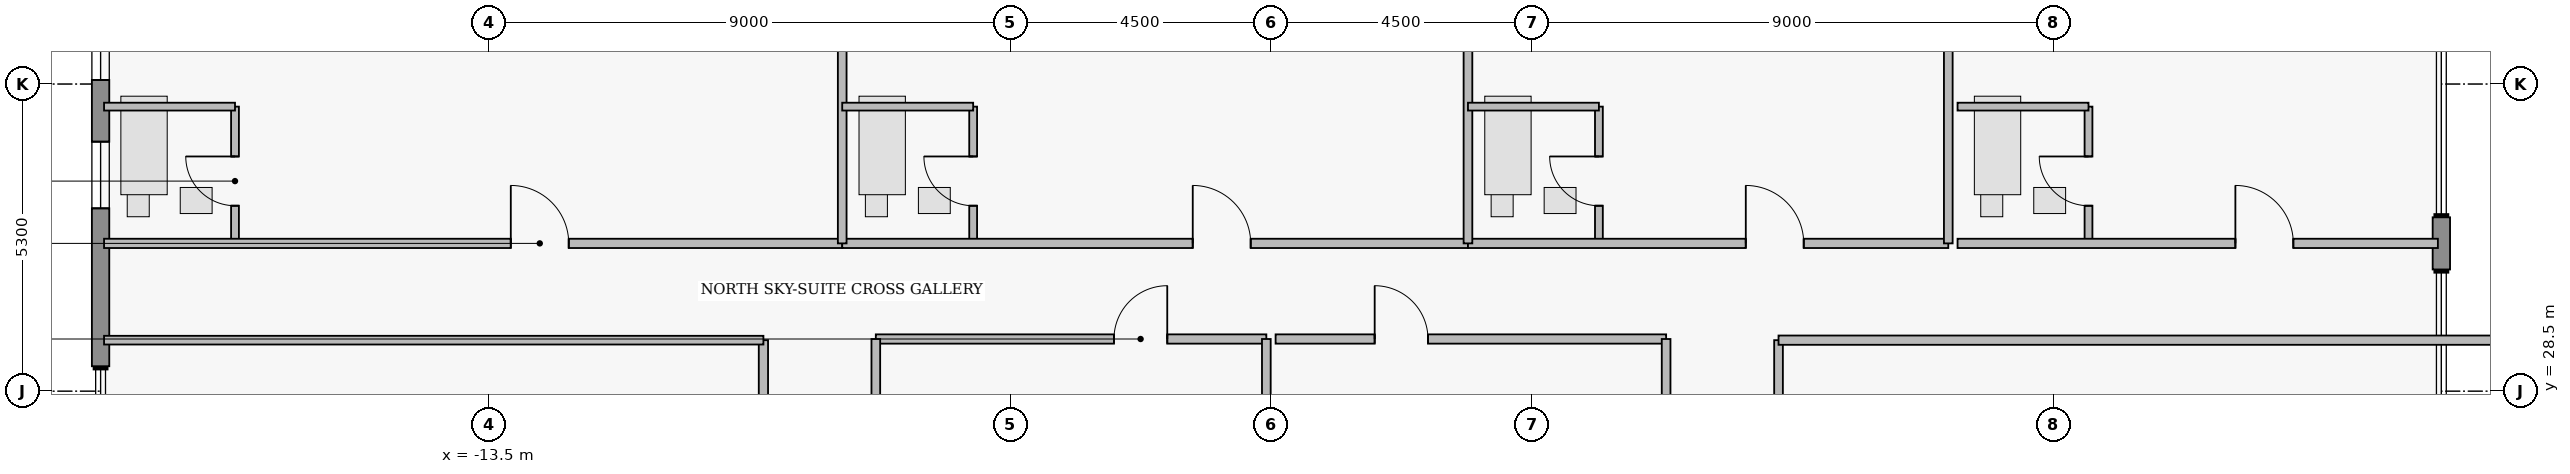
"""IFC4 building model, lengths in metres.
Left out: names, types, materials, properties, quantities, classifications, styles, units other than length and angle.
Written with IfcOpenShell. Run it as: python <this file> out.ifc"""

import sys

from ifc_helpers import new_model, si_unit, direction, frame, frame_2d, origin, place, context, subcontext, project, spatial, rectangle, extrude, element, fill, save


model = new_model("IFC4")
c1 = context("Model", 3, precision=1e-05, world=origin(), true_north=direction((0.0, 1.0)))
c2 = subcontext(c1, "Body", "Model", "MODEL_VIEW")
j1 = project(units=[si_unit("LENGTHUNIT", "METRE"), si_unit("PLANEANGLEUNIT", "RADIAN")], contexts=[c1])
p1 = place(None, origin())
s1 = spatial("IfcSite", under=j1, at=p1, CompositionType="ELEMENT")
p2 = place(p1, origin())
s2 = spatial("IfcBuilding", under=s1, at=p2, CompositionType="ELEMENT")
p3 = place(p2, frame((0.0, 0.0, 261.85)))
s3 = spatial("IfcBuildingStorey", under=s2, at=p3, CompositionType="ELEMENT", Elevation=261.85)
p4 = place(p3, frame((-20.2, 28.93, 0.0), z_axis=(0.0, 0.0, 1.0), x_axis=(0.0, 1.0, 0.0)))
e1 = element("IfcWall", 1, at=p4, inside=s3, PredefinedType="STANDARD", context=c2, shape_type="SweptSolid", body=[
    extrude(rectangle(XDim=6.67, YDim=0.3, at=frame_2d((3.335, 0.0))), origin(), (0.0, 0.0, 1.0), 3.48),
])
p5 = place(p4, frame((2.725, 0.0, 0.95)))
e2 = element("IfcOpeningElement", 2, at=p5, cuts=e1, PredefinedType="OPENING", context=c2, shape_type="SweptSolid", body=[
    extrude(rectangle(XDim=1.15, YDim=1.55, at=frame_2d((0.575, 0.775))), frame((0.0, 0.16, 0.0), z_axis=(0.0, -1.0, 0.0), x_axis=(1.0, 0.0, 0.0)), (0.0, 0.0, 1.0), 0.32),
])
p6 = place(p4, frame((4.94, 0.0, 0.95)))
e3 = element("IfcOpeningElement", 3, at=p6, cuts=e1, PredefinedType="OPENING", context=c2, shape_type="SweptSolid", body=[
    extrude(rectangle(XDim=1.15, YDim=1.55, at=frame_2d((0.575, 0.775))), frame((0.0, 0.16, 0.0), z_axis=(0.0, -1.0, 0.0), x_axis=(1.0, 0.0, 0.0)), (0.0, 0.0, 1.0), 0.32),
])
p7 = place(p3, frame((20.2, 31.5, 0.0), z_axis=(0.0, 0.0, 1.0), x_axis=(0.0, -1.0, 0.0)))
e4 = element("IfcWall", 4, at=p7, inside=s3, PredefinedType="STANDARD", context=c2, shape_type="SweptSolid", body=[
    extrude(rectangle(XDim=0.9, YDim=0.3, at=frame_2d((0.45, 0.0))), origin(), (0.0, 0.0, 1.0), 3.48),
])
p8 = place(p3, frame((-17.88, 31.05, 0.0), z_axis=(0.0, 0.0, 1.0), x_axis=(0.0, 1.0, 0.0)))
e5 = element("IfcWall", 5, at=p8, inside=s3, PredefinedType="PLUMBINGWALL", context=c2, shape_type="SweptSolid", body=[
    extrude(rectangle(XDim=2.36, YDim=0.135, at=frame_2d((1.18, 0.0))), origin(), (0.0, 0.0, 1.0), 3.48),
])
p9 = place(p8, frame((0.65, 0.0, 0.0)))
e6 = element("IfcOpeningElement", 6, at=p9, cuts=e5, PredefinedType="OPENING", context=c2, shape_type="SweptSolid", body=[
    extrude(rectangle(XDim=0.85, YDim=2.1, at=frame_2d((0.425, 1.05))), frame((0.0, 0.077, 0.0), z_axis=(0.0, -1.0, 0.0), x_axis=(1.0, 0.0, 0.0)), (0.0, 0.0, 1.0), 0.155),
])
p10 = place(p3, frame((-20.14, 31.05, 0.0), z_axis=(0.0, 0.0, 1.0), x_axis=(1.0, 0.0, 0.0)))
e7 = element("IfcWall", 7, at=p10, inside=s3, PredefinedType="PARTITIONING", context=c2, shape_type="SweptSolid", body=[
    extrude(rectangle(XDim=12.74, YDim=0.16, at=frame_2d((6.37, 0.0))), origin(), (0.0, 0.0, 1.0), 3.48),
])
p11 = place(p10, frame((7.02, 0.0, 0.0)))
e8 = element("IfcOpeningElement", 8, at=p11, cuts=e7, PredefinedType="OPENING", context=c2, shape_type="SweptSolid", body=[
    extrude(rectangle(XDim=1.0, YDim=2.15, at=frame_2d((0.5, 1.075))), frame((0.0, 0.09, 0.0), z_axis=(0.0, -1.0, 0.0), x_axis=(1.0, 0.0, 0.0)), (0.0, 0.0, 1.0), 0.18),
])
p12 = place(p3, frame((-5.14, 31.05, 0.0), z_axis=(0.0, 0.0, 1.0), x_axis=(0.0, 1.0, 0.0)))
e9 = element("IfcWall", 9, at=p12, inside=s3, PredefinedType="PLUMBINGWALL", context=c2, shape_type="SweptSolid", body=[
    extrude(rectangle(XDim=2.36, YDim=0.135, at=frame_2d((1.18, 0.0))), origin(), (0.0, 0.0, 1.0), 3.48),
])
p13 = place(p12, frame((0.65, 0.0, 0.0)))
e10 = element("IfcOpeningElement", 10, at=p13, cuts=e9, PredefinedType="OPENING", context=c2, shape_type="SweptSolid", body=[
    extrude(rectangle(XDim=0.85, YDim=2.1, at=frame_2d((0.425, 1.05))), frame((0.0, 0.077, 0.0), z_axis=(0.0, -1.0, 0.0), x_axis=(1.0, 0.0, 0.0)), (0.0, 0.0, 1.0), 0.155),
])
p14 = place(p3, frame((-7.4, 31.05, 0.0), z_axis=(0.0, 0.0, 1.0), x_axis=(1.0, 0.0, 0.0)))
e11 = element("IfcWall", 11, at=p14, inside=s3, PredefinedType="PARTITIONING", context=c2, shape_type="SweptSolid", body=[
    extrude(rectangle(XDim=10.8, YDim=0.16, at=frame_2d((5.4, 0.0))), origin(), (0.0, 0.0, 1.0), 3.48),
])
p15 = place(p14, frame((6.05, 0.0, 0.0)))
e12 = element("IfcOpeningElement", 12, at=p15, cuts=e11, PredefinedType="OPENING", context=c2, shape_type="SweptSolid", body=[
    extrude(rectangle(XDim=1.0, YDim=2.15, at=frame_2d((0.5, 1.075))), frame((0.0, 0.09, 0.0), z_axis=(0.0, -1.0, 0.0), x_axis=(1.0, 0.0, 0.0)), (0.0, 0.0, 1.0), 0.18),
])
p16 = place(p3, frame((5.66, 31.05, 0.0), z_axis=(0.0, 0.0, 1.0), x_axis=(0.0, 1.0, 0.0)))
e13 = element("IfcWall", 13, at=p16, inside=s3, PredefinedType="PLUMBINGWALL", context=c2, shape_type="SweptSolid", body=[
    extrude(rectangle(XDim=2.36, YDim=0.135, at=frame_2d((1.18, 0.0))), origin(), (0.0, 0.0, 1.0), 3.48),
])
p17 = place(p16, frame((0.65, 0.0, 0.0)))
e14 = element("IfcOpeningElement", 14, at=p17, cuts=e13, PredefinedType="OPENING", context=c2, shape_type="SweptSolid", body=[
    extrude(rectangle(XDim=0.85, YDim=2.1, at=frame_2d((0.425, 1.05))), frame((0.0, 0.077, 0.0), z_axis=(0.0, -1.0, 0.0), x_axis=(1.0, 0.0, 0.0)), (0.0, 0.0, 1.0), 0.155),
])
p18 = place(p3, frame((3.4, 31.05, 0.0), z_axis=(0.0, 0.0, 1.0), x_axis=(1.0, 0.0, 0.0)))
e15 = element("IfcWall", 15, at=p18, inside=s3, PredefinedType="PARTITIONING", context=c2, shape_type="SweptSolid", body=[
    extrude(rectangle(XDim=8.29, YDim=0.16, at=frame_2d((4.145, 0.0))), origin(), (0.0, 0.0, 1.0), 3.48),
])
p19 = place(p18, frame((4.795, 0.0, 0.0)))
e16 = element("IfcOpeningElement", 16, at=p19, cuts=e15, PredefinedType="OPENING", context=c2, shape_type="SweptSolid", body=[
    extrude(rectangle(XDim=1.0, YDim=2.15, at=frame_2d((0.5, 1.075))), frame((0.0, 0.09, 0.0), z_axis=(0.0, -1.0, 0.0), x_axis=(1.0, 0.0, 0.0)), (0.0, 0.0, 1.0), 0.18),
])
p20 = place(p3, frame((14.11, 31.05, 0.0), z_axis=(0.0, 0.0, 1.0), x_axis=(0.0, 1.0, 0.0)))
e17 = element("IfcWall", 17, at=p20, inside=s3, PredefinedType="PLUMBINGWALL", context=c2, shape_type="SweptSolid", body=[
    extrude(rectangle(XDim=2.36, YDim=0.135, at=frame_2d((1.18, 0.0))), origin(), (0.0, 0.0, 1.0), 2.362),
])
p21 = place(p20, frame((0.65, 0.0, 0.0)))
e18 = element("IfcOpeningElement", 18, at=p21, cuts=e17, PredefinedType="OPENING", context=c2, shape_type="SweptSolid", body=[
    extrude(rectangle(XDim=0.85, YDim=2.1, at=frame_2d((0.425, 1.05))), frame((0.0, 0.077, 0.0), z_axis=(0.0, -1.0, 0.0), x_axis=(1.0, 0.0, 0.0)), (0.0, 0.0, 1.0), 0.155),
])
p22 = place(p3, frame((11.85, 31.05, 0.0), z_axis=(0.0, 0.0, 1.0), x_axis=(1.0, 0.0, 0.0)))
e19 = element("IfcWall", 19, at=p22, inside=s3, PredefinedType="PARTITIONING", context=c2, shape_type="SweptSolid", body=[
    extrude(rectangle(XDim=8.29, YDim=0.16, at=frame_2d((4.145, 0.0))), origin(), (0.0, 0.0, 1.0), 3.48),
])
p23 = place(p22, frame((4.795, 0.0, 0.0)))
e20 = element("IfcOpeningElement", 20, at=p23, cuts=e19, PredefinedType="OPENING", context=c2, shape_type="SweptSolid", body=[
    extrude(rectangle(XDim=1.0, YDim=2.15, at=frame_2d((0.5, 1.075))), frame((0.0, 0.09, 0.0), z_axis=(0.0, -1.0, 0.0), x_axis=(1.0, 0.0, 0.0)), (0.0, 0.0, 1.0), 0.18),
])
p24 = place(p3, frame((-6.82, 29.4, 0.0), z_axis=(0.0, 0.0, 1.0), x_axis=(1.0, 0.0, 0.0)))
e21 = element("IfcWall", 21, at=p24, inside=s3, PredefinedType="PARTITIONING", context=c2, shape_type="SweptSolid", body=[
    extrude(rectangle(XDim=6.74, YDim=0.16, at=frame_2d((3.37, 0.0))), origin(), (0.0, 0.0, 1.0), 3.48),
])
p25 = place(p24, frame((4.11, 0.0, 0.0)))
e22 = element("IfcOpeningElement", 22, at=p25, cuts=e21, PredefinedType="OPENING", context=c2, shape_type="SweptSolid", body=[
    extrude(rectangle(XDim=0.92, YDim=2.12, at=frame_2d((0.46, 1.06))), frame((0.0, 0.09, 0.0), z_axis=(0.0, -1.0, 0.0), x_axis=(1.0, 0.0, 0.0)), (0.0, 0.0, 1.0), 0.18),
])
p26 = place(p3, frame((0.08, 29.4, 0.0), z_axis=(0.0, 0.0, 1.0), x_axis=(1.0, 0.0, 0.0)))
e23 = element("IfcWall", 23, at=p26, inside=s3, PredefinedType="PARTITIONING", context=c2, shape_type="SweptSolid", body=[
    extrude(rectangle(XDim=6.74, YDim=0.16, at=frame_2d((3.37, 0.0))), origin(), (0.0, 0.0, 1.0), 3.48),
])
p27 = place(p26, frame((1.71, 0.0, 0.0)))
e24 = element("IfcOpeningElement", 24, at=p27, cuts=e23, PredefinedType="OPENING", context=c2, shape_type="SweptSolid", body=[
    extrude(rectangle(XDim=0.92, YDim=2.12, at=frame_2d((0.46, 1.06))), frame((0.0, 0.09, 0.0), z_axis=(0.0, -1.0, 0.0), x_axis=(1.0, 0.0, 0.0)), (0.0, 0.0, 1.0), 0.18),
])
p28 = place(p3, frame((-8.76, 26.26, 0.0), z_axis=(0.0, 0.0, 1.0), x_axis=(0.0, 1.0, 0.0)))
e25 = element("IfcWall", 25, at=p28, inside=s3, PredefinedType="PARTITIONING", context=c2, shape_type="SweptSolid", body=[
    extrude(rectangle(XDim=3.12, YDim=0.16, at=frame_2d((1.56, 0.0))), origin(), (0.0, 0.0, 1.0), 3.48),
])
p29 = place(p28, frame((1.1, 0.0, 0.0)))
e26 = element("IfcOpeningElement", 26, at=p29, cuts=e25, PredefinedType="OPENING", context=c2, shape_type="SweptSolid", body=[
    extrude(rectangle(XDim=0.92, YDim=2.12, at=frame_2d((0.46, 1.06))), frame((0.0, 0.09, 0.0), z_axis=(0.0, -1.0, 0.0), x_axis=(1.0, 0.0, 0.0)), (0.0, 0.0, 1.0), 0.18),
])
p30 = place(p3, frame((-20.14, 33.41, 0.0), z_axis=(0.0, 0.0, 1.0), x_axis=(1.0, 0.0, 0.0)))
e27 = element("IfcWall", 27, at=p30, inside=s3, PredefinedType="PLUMBINGWALL", context=c2, shape_type="SweptSolid", body=[
    extrude(rectangle(XDim=2.26, YDim=0.135, at=frame_2d((1.13, 0.0))), origin(), (0.0, 0.0, 1.0), 3.48),
])
p31 = place(p3, frame((-7.4, 31.05, 0.0), z_axis=(0.0, 0.0, 1.0), x_axis=(0.0, 1.0, 0.0)))
e28 = element("IfcWall", 28, at=p31, inside=s3, PredefinedType="PARTITIONING", context=c2, shape_type="SweptSolid", body=[
    extrude(rectangle(XDim=7.87, YDim=0.15, at=frame_2d((3.935, 0.0))), origin(), (0.0, 0.0, 1.0), 3.48),
])
p32 = place(p3, frame((-7.4, 33.41, 0.0), z_axis=(0.0, 0.0, 1.0), x_axis=(1.0, 0.0, 0.0)))
e29 = element("IfcWall", 29, at=p32, inside=s3, PredefinedType="PLUMBINGWALL", context=c2, shape_type="SweptSolid", body=[
    extrude(rectangle(XDim=2.26, YDim=0.135, at=frame_2d((1.13, 0.0))), origin(), (0.0, 0.0, 1.0), 3.076),
])
p33 = place(p3, frame((3.4, 31.05, 0.0), z_axis=(0.0, 0.0, 1.0), x_axis=(0.0, 1.0, 0.0)))
e30 = element("IfcWall", 30, at=p33, inside=s3, PredefinedType="PARTITIONING", context=c2, shape_type="SweptSolid", body=[
    extrude(rectangle(XDim=7.87, YDim=0.15, at=frame_2d((3.935, 0.0))), origin(), (0.0, 0.0, 1.0), 3.48),
])
p34 = place(p3, frame((3.4, 33.41, 0.0), z_axis=(0.0, 0.0, 1.0), x_axis=(1.0, 0.0, 0.0)))
e31 = element("IfcWall", 31, at=p34, inside=s3, PredefinedType="PLUMBINGWALL", context=c2, shape_type="SweptSolid", body=[
    extrude(rectangle(XDim=2.26, YDim=0.135, at=frame_2d((1.13, 0.0))), origin(), (0.0, 0.0, 1.0), 3.076),
])
p35 = place(p3, frame((11.69, 31.05, 0.0), z_axis=(0.0, 0.0, 1.0), x_axis=(0.0, 1.0, 0.0)))
e32 = element("IfcWall", 32, at=p35, inside=s3, PredefinedType="PARTITIONING", context=c2, shape_type="SweptSolid", body=[
    extrude(rectangle(XDim=7.87, YDim=0.15, at=frame_2d((3.935, 0.0))), origin(), (0.0, 0.0, 1.0), 3.48),
])
p36 = place(p3, frame((11.85, 33.41, 0.0), z_axis=(0.0, 0.0, 1.0), x_axis=(1.0, 0.0, 0.0)))
e33 = element("IfcWall", 33, at=p36, inside=s3, PredefinedType="PLUMBINGWALL", context=c2, shape_type="SweptSolid", body=[
    extrude(rectangle(XDim=2.26, YDim=0.135, at=frame_2d((1.13, 0.0))), origin(), (0.0, 0.0, 1.0), 3.076),
])
for number, where, z_axis, x_axis in (
    (34, (-6.82, 27.0, 0.0), (0.0, 0.0, 1.0), (0.0, 1.0, 0.0)),
    (35, (-0.08, 27.0, 0.0), (0.0, 0.0, 1.0), (0.0, 1.0, 0.0)),
    (36, (6.82, 27.0, 0.0), (0.0, 0.0, 1.0), (0.0, 1.0, 0.0)),
):
    element("IfcWall", number, at=place(p3, frame(where, z_axis=z_axis, x_axis=x_axis)), inside=s3, PredefinedType="PARTITIONING", context=c2, shape_type="SweptSolid", body=[
        extrude(rectangle(XDim=2.4, YDim=0.15, at=frame_2d((1.2, 0.0))), origin(), (0.0, 0.0, 1.0), 3.48),
    ])
p37 = place(p3, frame((-20.14, 29.38, 0.0), z_axis=(0.0, 0.0, 1.0), x_axis=(1.0, 0.0, 0.0)))
e37 = element("IfcWall", 37, at=p37, inside=s3, PredefinedType="PARTITIONING", context=c2, shape_type="SweptSolid", body=[
    extrude(rectangle(XDim=11.38, YDim=0.15, at=frame_2d((5.69, 0.0))), origin(), (0.0, 0.0, 1.0), 3.48),
])
p38 = place(p3, frame((8.76, 16.7, 0.0), z_axis=(0.0, 0.0, 1.0), x_axis=(0.0, 1.0, 0.0)))
e38 = element("IfcWall", 38, at=p38, inside=s3, PredefinedType="PARTITIONING", context=c2, shape_type="SweptSolid", body=[
    extrude(rectangle(XDim=12.68, YDim=0.15, at=frame_2d((6.34, 0.0))), origin(), (0.0, 0.0, 1.0), 3.48),
])
p39 = place(p3, frame((8.76, 29.38, 0.0), z_axis=(0.0, 0.0, 1.0), x_axis=(1.0, 0.0, 0.0)))
e39 = element("IfcWall", 39, at=p39, inside=s3, PredefinedType="PARTITIONING", context=c2, shape_type="SweptSolid", body=[
    extrude(rectangle(XDim=13.88, YDim=0.16, at=frame_2d((6.94, 0.0))), origin(), (0.0, 0.0, 1.0), 3.48),
])
p40 = place(p5, origin())
e40 = element("IfcWindow", 40, at=p40, inside=s3, PartitioningType="SINGLE_PANEL", PredefinedType="WINDOW", context=c2, shape_type="SweptSolid", body=[
    extrude(rectangle(XDim=1.15, YDim=1.55, at=frame_2d((0.575, 0.775))), frame((0.0, 0.03, 0.0), z_axis=(0.0, -1.0, 0.0), x_axis=(1.0, 0.0, 0.0)), (0.0, 0.0, 1.0), 0.06),
])
fill(e2, e40)
p41 = place(p6, origin())
e41 = element("IfcWindow", 41, at=p41, inside=s3, PartitioningType="SINGLE_PANEL", PredefinedType="WINDOW", context=c2, shape_type="SweptSolid", body=[
    extrude(rectangle(XDim=1.15, YDim=1.55, at=frame_2d((0.575, 0.775))), frame((0.0, 0.03, 0.0), z_axis=(0.0, -1.0, 0.0), x_axis=(1.0, 0.0, 0.0)), (0.0, 0.0, 1.0), 0.06),
])
fill(e3, e41)
p42 = place(p9, origin())
e42 = element("IfcDoor", 42, at=p42, inside=s3, OperationType="SINGLE_SWING_RIGHT", PredefinedType="DOOR", context=c2, shape_type="SweptSolid", body=[
    extrude(rectangle(XDim=0.85, YDim=2.1, at=frame_2d((0.425, 1.05))), frame((0.0, 0.025, 0.0), z_axis=(0.0, -1.0, 0.0), x_axis=(1.0, 0.0, 0.0)), (0.0, 0.0, 1.0), 0.05),
])
fill(e6, e42)
p43 = place(p11, origin())
e43 = element("IfcDoor", 43, at=p43, inside=s3, OperationType="SINGLE_SWING_LEFT", PredefinedType="DOOR", context=c2, shape_type="SweptSolid", body=[
    extrude(rectangle(XDim=1.0, YDim=2.15, at=frame_2d((0.5, 1.075))), frame((0.0, 0.025, 0.0), z_axis=(0.0, -1.0, 0.0), x_axis=(1.0, 0.0, 0.0)), (0.0, 0.0, 1.0), 0.05),
])
fill(e8, e43)
p44 = place(p13, origin())
e44 = element("IfcDoor", 44, at=p44, inside=s3, OperationType="SINGLE_SWING_RIGHT", PredefinedType="DOOR", context=c2, shape_type="SweptSolid", body=[
    extrude(rectangle(XDim=0.85, YDim=2.1, at=frame_2d((0.425, 1.05))), frame((0.0, 0.025, 0.0), z_axis=(0.0, -1.0, 0.0), x_axis=(1.0, 0.0, 0.0)), (0.0, 0.0, 1.0), 0.05),
])
fill(e10, e44)
p45 = place(p15, origin())
e45 = element("IfcDoor", 45, at=p45, inside=s3, OperationType="SINGLE_SWING_LEFT", PredefinedType="DOOR", context=c2, shape_type="SweptSolid", body=[
    extrude(rectangle(XDim=1.0, YDim=2.15, at=frame_2d((0.5, 1.075))), frame((0.0, 0.025, 0.0), z_axis=(0.0, -1.0, 0.0), x_axis=(1.0, 0.0, 0.0)), (0.0, 0.0, 1.0), 0.05),
])
fill(e12, e45)
p46 = place(p17, origin())
e46 = element("IfcDoor", 46, at=p46, inside=s3, OperationType="SINGLE_SWING_RIGHT", PredefinedType="DOOR", context=c2, shape_type="SweptSolid", body=[
    extrude(rectangle(XDim=0.85, YDim=2.1, at=frame_2d((0.425, 1.05))), frame((0.0, 0.025, 0.0), z_axis=(0.0, -1.0, 0.0), x_axis=(1.0, 0.0, 0.0)), (0.0, 0.0, 1.0), 0.05),
])
fill(e14, e46)
p47 = place(p19, origin())
e47 = element("IfcDoor", 47, at=p47, inside=s3, OperationType="SINGLE_SWING_LEFT", PredefinedType="DOOR", context=c2, shape_type="SweptSolid", body=[
    extrude(rectangle(XDim=1.0, YDim=2.15, at=frame_2d((0.5, 1.075))), frame((0.0, 0.025, 0.0), z_axis=(0.0, -1.0, 0.0), x_axis=(1.0, 0.0, 0.0)), (0.0, 0.0, 1.0), 0.05),
])
fill(e16, e47)
p48 = place(p21, origin())
e48 = element("IfcDoor", 48, at=p48, inside=s3, OperationType="SINGLE_SWING_RIGHT", PredefinedType="DOOR", context=c2, shape_type="SweptSolid", body=[
    extrude(rectangle(XDim=0.85, YDim=2.1, at=frame_2d((0.425, 1.05))), frame((0.0, 0.025, 0.0), z_axis=(0.0, -1.0, 0.0), x_axis=(1.0, 0.0, 0.0)), (0.0, 0.0, 1.0), 0.05),
])
fill(e18, e48)
p49 = place(p23, origin())
e49 = element("IfcDoor", 49, at=p49, inside=s3, OperationType="SINGLE_SWING_LEFT", PredefinedType="DOOR", context=c2, shape_type="SweptSolid", body=[
    extrude(rectangle(XDim=1.0, YDim=2.15, at=frame_2d((0.5, 1.075))), frame((0.0, 0.025, 0.0), z_axis=(0.0, -1.0, 0.0), x_axis=(1.0, 0.0, 0.0)), (0.0, 0.0, 1.0), 0.05),
])
fill(e20, e49)
p50 = place(p25, origin())
e50 = element("IfcDoor", 50, at=p50, inside=s3, OperationType="SINGLE_SWING_RIGHT", PredefinedType="DOOR", context=c2, shape_type="SweptSolid", body=[
    extrude(rectangle(XDim=0.92, YDim=2.12, at=frame_2d((0.46, 1.06))), frame((0.0, 0.025, 0.0), z_axis=(0.0, -1.0, 0.0), x_axis=(1.0, 0.0, 0.0)), (0.0, 0.0, 1.0), 0.05),
])
fill(e22, e50)
p51 = place(p27, origin())
e51 = element("IfcDoor", 51, at=p51, inside=s3, OperationType="SINGLE_SWING_LEFT", PredefinedType="DOOR", context=c2, shape_type="SweptSolid", body=[
    extrude(rectangle(XDim=0.92, YDim=2.12, at=frame_2d((0.46, 1.06))), frame((0.0, 0.025, 0.0), z_axis=(0.0, -1.0, 0.0), x_axis=(1.0, 0.0, 0.0)), (0.0, 0.0, 1.0), 0.05),
])
fill(e24, e51)
save(model, sys.argv[1])
